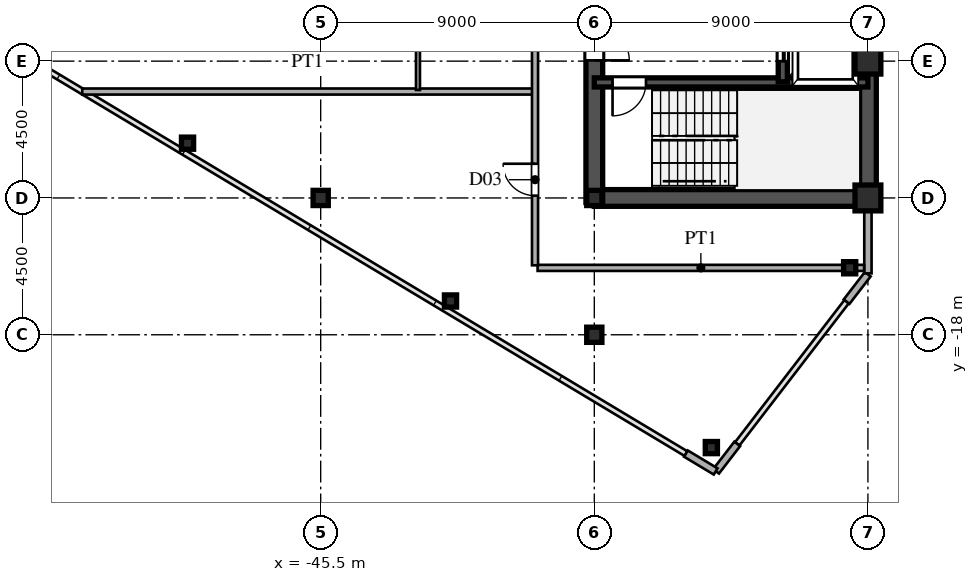
"""IFC4 building model, lengths in metres.
Left out: names, types, materials, properties, quantities, classifications, styles, units other than length and angle.
Written with IfcOpenShell. Run it as: python <this file> out.ifc"""

import sys

from ifc_helpers import new_model, si_unit, direction, frame, frame_2d, origin, origin_2d, place, context, subcontext, project, spatial, rectangle, hollow_rectangle, i_section, extrude, source, transform, mapped, element, fill, save


model = new_model("IFC4")
c1 = context("Model", 3, precision=1e-05, world=origin(), true_north=direction((0.0, 1.0)))
c2 = subcontext(c1, "Body", "Model", "MODEL_VIEW")
j1 = project(units=[si_unit("LENGTHUNIT", "METRE"), si_unit("PLANEANGLEUNIT", "RADIAN")], contexts=[c1])
p1 = place(None, origin())
s1 = spatial("IfcSite", under=j1, at=p1, CompositionType="ELEMENT")
p2 = place(p1, origin())
s2 = spatial("IfcBuilding", under=s1, at=p2, CompositionType="ELEMENT")
p3 = place(p2, frame((0.0, 0.0, 206.7)))
s3 = spatial("IfcBuildingStorey", under=s2, at=p3, CompositionType="ELEMENT", Elevation=206.7)
m1 = source(origin(), c2, "Body", "SweptSolid", [
    extrude(hollow_rectangle(XDim=0.85, YDim=0.85, WallThickness=0.036, at=origin_2d()), origin(), (0.0, 0.0, 1.0), 3.6),
])
for number, where, z_axis, x_axis in (
    (1, (-27.5, -13.5, 0.0), (0.0, 0.0, 1.0), (1.0, 0.0, 0.0)),
    (2, (-27.5, -9.0, 0.0), (0.0, 0.0, 1.0), (1.0, 0.0, 0.0)),
):
    element("IfcColumn", number, at=place(p3, frame(where, z_axis=z_axis, x_axis=x_axis)), inside=s3, PredefinedType="COLUMN", context=c2, shape_type="MappedRepresentation", body=[
        mapped(m1, transform((0.0, 0.0, 0.0), scale=1.0)),
    ])
m2 = source(origin(), c2, "Body", "SweptSolid", [
    extrude(i_section(OverallWidth=0.5, OverallDepth=0.5, WebThickness=0.02, FlangeThickness=0.032, at=origin_2d()), origin(), (0.0, 0.0, 1.0), 3.6),
])
for number, where, z_axis, x_axis in (
    (3, (-36.5, -18.0, 0.0), (0.0, 0.0, 1.0), (1.0, 0.0, 0.0)),
    (4, (-36.5, -13.5, 0.0), (0.0, 0.0, 1.0), (1.0, 0.0, 0.0)),
    (5, (-45.5, -13.5, 0.0), (0.0, 0.0, 1.0), (1.0, 0.0, 0.0)),
):
    element("IfcColumn", number, at=place(p3, frame(where, z_axis=z_axis, x_axis=x_axis)), inside=s3, PredefinedType="COLUMN", context=c2, shape_type="MappedRepresentation", body=[
        mapped(m2, transform((0.0, 0.0, 0.0), scale=1.0)),
    ])
m3 = source(origin(), c2, "Body", "SweptSolid", [
    extrude(hollow_rectangle(XDim=0.4, YDim=0.4, WallThickness=0.016, at=origin_2d()), origin(), (0.0, 0.0, 1.0), 3.6),
])
for number, where, z_axis, x_axis in (
    (6, (-28.1, -15.796, 0.0), (0.0, 0.0, 1.0), (1.0, 0.0, 0.0)),
    (7, (-32.65, -21.71, 0.0), (0.0, 0.0, 1.0), (1.0, 0.0, 0.0)),
    (8, (-41.23, -16.889, 0.0), (0.0, 0.0, 1.0), (1.0, 0.0, 0.0)),
    (9, (-49.88, -11.699, 0.0), (0.0, 0.0, 1.0), (1.0, 0.0, 0.0)),
):
    element("IfcColumn", number, at=place(p3, frame(where, z_axis=z_axis, x_axis=x_axis)), inside=s3, PredefinedType="COLUMN", context=c2, shape_type="MappedRepresentation", body=[
        mapped(m3, transform((0.0, 0.0, 0.0), scale=1.0)),
    ])
p4 = place(p3, frame((-27.5, -15.98, 0.0), z_axis=(0.0, 0.0, 1.0), x_axis=(0.0, 1.0, 0.0)))
e10 = element("IfcWall", 10, at=p4, inside=s3, PredefinedType="SOLIDWALL", context=c2, shape_type="SweptSolid", body=[
    extrude(rectangle(XDim=1.6, YDim=0.24, at=frame_2d((0.8, 0.0))), origin(), (0.0, 0.0, 1.0), 3.38),
])
p5 = place(p3, frame((-27.5, -14.38, 0.0), z_axis=(0.0, 0.0, 1.0), x_axis=(0.0, 1.0, 0.0)))
e11 = element("IfcWall", 11, at=p5, inside=s3, PredefinedType="SOLIDWALL", context=c2, shape_type="SweptSolid", body=[
    extrude(rectangle(XDim=0.6, YDim=0.24, at=frame_2d((0.3, 0.0))), origin(), (0.0, 0.0, 1.0), 2.88),
])
for number, where, z_axis, x_axis in (
    (12, (-33.486, -21.908, 0.0), (0.0, 0.0, 1.0), (0.857, -0.515, 0.0)),
    (13, (-32.494, -22.492, 0.0), (0.0, 0.0, 1.0), (0.61, 0.793, 0.0)),
    (14, (-28.201, -16.912, 0.0), (0.0, 0.0, 1.0), (0.61, 0.793, 0.0)),
):
    element("IfcWall", number, at=place(p3, frame(where, z_axis=z_axis, x_axis=x_axis)), inside=s3, PredefinedType="SOLIDWALL", context=c2, shape_type="SweptSolid", body=[
        extrude(rectangle(XDim=1.14, YDim=0.24, at=frame_2d((0.57, 0.0))), origin(), (0.0, 0.0, 1.0), 3.38),
    ])
p6 = place(p3, frame((-27.5, -13.5, 0.0), z_axis=(0.0, 0.0, 1.0), x_axis=(0.0, 1.0, 0.0)))
e15 = element("IfcWall", 15, at=p6, inside=s3, PredefinedType="SHEAR", context=c2, shape_type="SweptSolid", body=[
    extrude(rectangle(XDim=12.2, YDim=0.55, at=frame_2d((6.1, 0.0))), origin(), (0.0, 0.0, 1.0), 3.38),
])
p7 = place(p3, frame((-36.5, -13.5, 0.0), z_axis=(0.0, 0.0, 1.0), x_axis=(1.0, 0.0, 0.0)))
e16 = element("IfcWall", 16, at=p7, inside=s3, PredefinedType="SHEAR", context=c2, shape_type="SweptSolid", body=[
    extrude(rectangle(XDim=9.0, YDim=0.55, at=frame_2d((4.5, 0.0))), origin(), (0.0, 0.0, 1.0), 3.38),
])
p8 = place(p3, frame((-36.5, -13.65, 0.0), z_axis=(0.0, 0.0, 1.0), x_axis=(0.0, 1.0, 0.0)))
e17 = element("IfcWall", 17, at=p8, inside=s3, PredefinedType="SHEAR", context=c2, shape_type="SweptSolid", body=[
    extrude(rectangle(XDim=7.15, YDim=0.55, at=frame_2d((3.575, 0.0))), origin(), (0.0, 0.0, 1.0), 3.38),
])
p9 = place(p8, frame((4.675, 0.0, 0.0)))
e18 = element("IfcOpeningElement", 18, at=p9, cuts=e17, PredefinedType="OPENING", context=c2, shape_type="SweptSolid", body=[
    extrude(rectangle(XDim=1.15, YDim=2.2, at=frame_2d((0.575, 1.1))), frame((0.0, 0.285, 0.0), z_axis=(0.0, -1.0, 0.0), x_axis=(1.0, 0.0, 0.0)), (0.0, 0.0, 1.0), 0.57),
])
p10 = place(p3, frame((-36.5, -9.7, 0.0), z_axis=(0.0, 0.0, 1.0), x_axis=(1.0, 0.0, 0.0)))
e19 = element("IfcWall", 19, at=p10, inside=s3, PredefinedType="SHEAR", context=c2, shape_type="SweptSolid", body=[
    extrude(rectangle(XDim=9.0, YDim=0.3, at=frame_2d((4.5, 0.0))), origin(), (0.0, 0.0, 1.0), 3.38),
])
p11 = place(p10, frame((0.6, 0.0, 0.0)))
e20 = element("IfcOpeningElement", 20, at=p11, cuts=e19, PredefinedType="OPENING", context=c2, shape_type="SweptSolid", body=[
    extrude(rectangle(XDim=1.1, YDim=2.2, at=frame_2d((0.55, 1.1))), frame((0.0, 0.16, 0.0), z_axis=(0.0, -1.0, 0.0), x_axis=(1.0, 0.0, 0.0)), (0.0, 0.0, 1.0), 0.32),
])
p12 = place(p3, frame((-30.3, -9.68, 0.0), z_axis=(0.0, 0.0, 1.0), x_axis=(0.0, 1.0, 0.0)))
e21 = element("IfcWall", 21, at=p12, inside=s3, PredefinedType="SHEAR", context=c2, shape_type="SweptSolid", body=[
    extrude(rectangle(XDim=2.56, YDim=0.3, at=frame_2d((1.28, 0.0))), origin(), (0.0, 0.0, 1.0), 3.38),
])
p13 = place(p12, frame((0.68, 0.0, 0.0)))
e22 = element("IfcOpeningElement", 22, at=p13, cuts=e21, PredefinedType="OPENING", context=c2, shape_type="SweptSolid", body=[
    extrude(rectangle(XDim=1.2, YDim=2.25, at=frame_2d((0.6, 1.125))), frame((0.0, 0.16, 0.0), z_axis=(0.0, -1.0, 0.0), x_axis=(1.0, 0.0, 0.0)), (0.0, 0.0, 1.0), 0.32),
])
p14 = place(p3, frame((-38.365, -15.8, 0.0), z_axis=(0.0, 0.0, 1.0), x_axis=(1.0, 0.0, 0.0)))
e23 = element("IfcWall", 23, at=p14, inside=s3, PredefinedType="PARTITIONING", context=c2, shape_type="SweptSolid", body=[
    extrude(rectangle(XDim=10.74, YDim=0.2, at=frame_2d((5.37, 0.0))), origin(), (0.0, 0.0, 1.0), 3.38),
])
p15 = place(p3, frame((-53.343, -10.0, 0.0), z_axis=(0.0, 0.0, 1.0), x_axis=(1.0, 0.0, 0.0)))
e24 = element("IfcWall", 24, at=p15, inside=s3, PredefinedType="PARTITIONING", context=c2, shape_type="SweptSolid", body=[
    extrude(rectangle(XDim=14.813, YDim=0.2, at=frame_2d((7.406, 0.0))), origin(), (0.0, 0.0, 1.0), 3.38),
])
p16 = place(p3, frame((-42.3, -9.95, 0.0), z_axis=(0.0, 0.0, 1.0), x_axis=(0.0, 1.0, 0.0)))
e25 = element("IfcWall", 25, at=p16, inside=s3, PredefinedType="PARTITIONING", context=c2, shape_type="SweptSolid", body=[
    extrude(rectangle(XDim=3.3, YDim=0.13, at=frame_2d((1.65, 0.0))), origin(), (0.0, 0.0, 1.0), 3.38),
])
p17 = place(p3, frame((-38.45, -15.715, 0.0), z_axis=(0.0, 0.0, 1.0), x_axis=(0.0, 1.0, 0.0)))
e26 = element("IfcWall", 26, at=p17, inside=s3, PredefinedType="PARTITIONING", context=c2, shape_type="SweptSolid", body=[
    extrude(rectangle(XDim=31.43, YDim=0.2, at=frame_2d((15.715, 0.0))), origin(), (0.0, 0.0, 1.0), 3.38),
])
p18 = place(p17, frame((2.29, 0.0, 0.0)))
e27 = element("IfcOpeningElement", 27, at=p18, cuts=e26, PredefinedType="OPENING", context=c2, shape_type="SweptSolid", body=[
    extrude(rectangle(XDim=1.05, YDim=2.25, at=frame_2d((0.525, 1.125))), frame((0.0, 0.11, 0.0), z_axis=(0.0, -1.0, 0.0), x_axis=(1.0, 0.0, 0.0)), (0.0, 0.0, 1.0), 0.22),
])
p19 = place(p17, frame((11.301, 0.0, 0.0)))
e28 = element("IfcOpeningElement", 28, at=p19, cuts=e26, PredefinedType="OPENING", context=c2, shape_type="SweptSolid", body=[
    extrude(rectangle(XDim=1.05, YDim=2.25, at=frame_2d((0.525, 1.125))), frame((0.0, 0.11, 0.0), z_axis=(0.0, -1.0, 0.0), x_axis=(1.0, 0.0, 0.0)), (0.0, 0.0, 1.0), 0.22),
])
p20 = place(p17, frame((24.39, 0.0, 0.0)))
e29 = element("IfcOpeningElement", 29, at=p20, cuts=e26, PredefinedType="OPENING", context=c2, shape_type="SweptSolid", body=[
    extrude(rectangle(XDim=1.05, YDim=2.25, at=frame_2d((0.525, 1.125))), frame((0.0, 0.11, 0.0), z_axis=(0.0, -1.0, 0.0), x_axis=(1.0, 0.0, 0.0)), (0.0, 0.0, 1.0), 0.22),
])
m4 = source(origin(), c2, "Body", "SweptSolid", [
    extrude(rectangle(XDim=1.15, YDim=2.2, at=frame_2d((0.575, 1.1))), frame((0.0, 0.025, 0.0), z_axis=(0.0, -1.0, 0.0), x_axis=(1.0, 0.0, 0.0)), (0.0, 0.0, 1.0), 0.05),
])
p21 = place(p9, frame((1.15, 0.0, 0.0), z_axis=(0.0, 0.0, 1.0), x_axis=(-1.0, 0.0, 0.0)))
e30 = element("IfcDoor", 30, at=p21, inside=s3, OperationType="SINGLE_SWING_LEFT", PredefinedType="DOOR", context=c2, shape_type="MappedRepresentation", body=[
    mapped(m4, transform((0.0, 0.0, 0.0), scale=1.0)),
])
fill(e18, e30)
m5 = source(origin(), c2, "Body", "SweptSolid", [
    extrude(rectangle(XDim=1.1, YDim=2.2, at=frame_2d((0.55, 1.1))), frame((0.0, 0.025, 0.0), z_axis=(0.0, -1.0, 0.0), x_axis=(1.0, 0.0, 0.0)), (0.0, 0.0, 1.0), 0.05),
])
p22 = place(p11, frame((1.1, 0.0, 0.0), z_axis=(0.0, 0.0, 1.0), x_axis=(-1.0, 0.0, 0.0)))
e31 = element("IfcDoor", 31, at=p22, inside=s3, OperationType="SINGLE_SWING_LEFT", PredefinedType="DOOR", context=c2, shape_type="MappedRepresentation", body=[
    mapped(m5, transform((0.0, 0.0, 0.0), scale=1.0)),
])
fill(e20, e31)
m6 = source(origin(), c2, "Body", "SweptSolid", [
    extrude(rectangle(XDim=1.2, YDim=2.25, at=frame_2d((0.6, 1.125))), frame((0.0, 0.025, 0.0), z_axis=(0.0, -1.0, 0.0), x_axis=(1.0, 0.0, 0.0)), (0.0, 0.0, 1.0), 0.05),
])
p23 = place(p13, origin())
e32 = element("IfcDoor", 32, at=p23, inside=s3, OperationType="DOUBLE_DOOR_SLIDING", PredefinedType="DOOR", context=c2, shape_type="MappedRepresentation", body=[
    mapped(m6, transform((0.0, 0.0, 0.0), scale=1.0)),
])
fill(e22, e32)
m7 = source(origin(), c2, "Body", "SweptSolid", [
    extrude(rectangle(XDim=1.05, YDim=2.25, at=frame_2d((0.525, 1.125))), frame((0.0, 0.025, 0.0), z_axis=(0.0, -1.0, 0.0), x_axis=(1.0, 0.0, 0.0)), (0.0, 0.0, 1.0), 0.05),
])
p24 = place(p18, origin())
e33 = element("IfcDoor", 33, at=p24, inside=s3, OperationType="SINGLE_SWING_RIGHT", PredefinedType="DOOR", context=c2, shape_type="MappedRepresentation", body=[
    mapped(m7, transform((0.0, 0.0, 0.0), scale=1.0)),
])
fill(e27, e33)
save(model, sys.argv[1])
